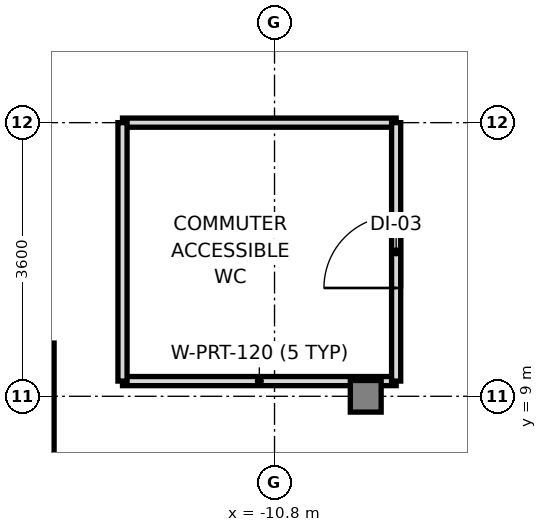
"""IFC4 building model, lengths in metres.
Left out: names, types, materials, properties, quantities, classifications, styles, units other than length and angle.
Written with IfcOpenShell. Run it as: python <this file> out.ifc"""

import sys

from ifc_helpers import new_model, si_unit, direction, frame, frame_2d, origin, origin_2d, place, context, subcontext, project, spatial, rectangle, i_section, extrude, source, transform, mapped, element, fill, save


model = new_model("IFC4")
c1 = context("Model", 3, precision=1e-05, world=origin(), true_north=direction((0.0, 1.0)))
c2 = subcontext(c1, "Body", "Model", "MODEL_VIEW")
j1 = project(units=[si_unit("LENGTHUNIT", "METRE"), si_unit("PLANEANGLEUNIT", "RADIAN")], contexts=[c1])
p1 = place(None, origin())
s1 = spatial("IfcSite", under=j1, at=p1, CompositionType="ELEMENT")
p2 = place(p1, origin())
s2 = spatial("IfcBuilding", under=s1, at=p2, CompositionType="ELEMENT")
p3 = place(p2, frame((0.0, 0.0, -4.2)))
s3 = spatial("IfcBuildingStorey", under=s2, at=p3, CompositionType="ELEMENT", Elevation=-4.2)
m1 = source(origin(), c2, "Body", "SweptSolid", [
    extrude(rectangle(XDim=1.4, YDim=1.4, at=origin_2d()), origin(), (0.0, 0.0, 1.0), 3.95),
])
p4 = place(p3, frame((-14.4, 9.0, 0.0), z_axis=(0.0, 0.0, 1.0), x_axis=(1.0, 0.0, 0.0)))
e1 = element("IfcColumn", 1, at=p4, inside=s3, PredefinedType="COLUMN", context=c2, shape_type="MappedRepresentation", body=[
    mapped(m1, transform((0.0, 0.0, 0.0), x_axis=(1.0, 0.0, 0.0), y_axis=(0.0, 1.0, 0.0), z_axis=(0.0, 0.0, 1.0), scale=1.0)),
])
m2 = source(origin(), c2, "Body", "SweptSolid", [
    extrude(i_section(OverallWidth=0.406, OverallDepth=0.416, WebThickness=0.024, FlangeThickness=0.039, at=origin_2d()), origin(), (0.0, 0.0, 1.0), 3.95),
])
p5 = place(p3, frame((-9.6, 9.0, 0.0), z_axis=(0.0, 0.0, 1.0), x_axis=(1.0, 0.0, 0.0)))
e2 = element("IfcColumn", 2, at=p5, inside=s3, PredefinedType="COLUMN", context=c2, shape_type="MappedRepresentation", body=[
    mapped(m2, transform((0.0, 0.0, 0.0), x_axis=(1.0, 0.0, 0.0), y_axis=(0.0, 1.0, 0.0), z_axis=(0.0, 0.0, 1.0), scale=1.0)),
])
for number, where, z_axis, x_axis in (
    (3, (-12.8, 9.2, 0.0), (0.0, 0.0, 1.0), (1.0, 0.0, 0.0)),
    (4, (-12.8, 12.6, 0.0), (0.0, 0.0, 1.0), (1.0, 0.0, 0.0)),
):
    element("IfcWall", number, at=place(p3, frame(where, z_axis=z_axis, x_axis=x_axis)), inside=s3, PredefinedType="PARTITIONING", context=c2, shape_type="SweptSolid", body=[
        extrude(rectangle(XDim=3.6, YDim=0.12, at=frame_2d((1.8, 0.0))), origin(), (0.0, 0.0, 1.0), 3.95),
    ])
p6 = place(p3, frame((-12.8, 9.2, 0.0), z_axis=(0.0, 0.0, 1.0), x_axis=(0.0, 1.0, 0.0)))
e5 = element("IfcWall", 5, at=p6, inside=s3, PredefinedType="PARTITIONING", context=c2, shape_type="SweptSolid", body=[
    extrude(rectangle(XDim=3.4, YDim=0.12, at=frame_2d((1.7, 0.0))), origin(), (0.0, 0.0, 1.0), 3.95),
])
p7 = place(p3, frame((-9.2, 9.2, 0.0), z_axis=(0.0, 0.0, 1.0), x_axis=(0.0, 1.0, 0.0)))
e6 = element("IfcWall", 6, at=p7, inside=s3, PredefinedType="PARTITIONING", context=c2, shape_type="SweptSolid", body=[
    extrude(rectangle(XDim=3.4, YDim=0.12, at=frame_2d((1.7, 0.0))), origin(), (0.0, 0.0, 1.0), 3.95),
])
p8 = place(p7, frame((1.225, 0.0, 0.0)))
e7 = element("IfcOpeningElement", 7, at=p8, cuts=e6, PredefinedType="OPENING", context=c2, shape_type="SweptSolid", body=[
    extrude(rectangle(XDim=0.95, YDim=2.15, at=frame_2d((0.475, 1.075))), frame((0.0, 0.07, 0.0), z_axis=(0.0, -1.0, 0.0), x_axis=(1.0, 0.0, 0.0)), (0.0, 0.0, 1.0), 0.14),
])
m3 = source(origin(), c2, "Body", "SweptSolid", [
    extrude(rectangle(XDim=0.95, YDim=2.15, at=frame_2d((0.475, 1.075))), frame((0.0, 0.025, 0.0), z_axis=(0.0, -1.0, 0.0), x_axis=(1.0, 0.0, 0.0)), (0.0, 0.0, 1.0), 0.05),
])
p9 = place(p8, origin())
e8 = element("IfcDoor", 8, at=p9, inside=s3, OperationType="SINGLE_SWING_LEFT", PredefinedType="DOOR", context=c2, shape_type="MappedRepresentation", body=[
    mapped(m3, transform((0.0, 0.0, 0.0), x_axis=(1.0, 0.0, 0.0), y_axis=(0.0, 1.0, 0.0), z_axis=(0.0, 0.0, 1.0), scale=1.0)),
])
fill(e7, e8)
save(model, sys.argv[1])
